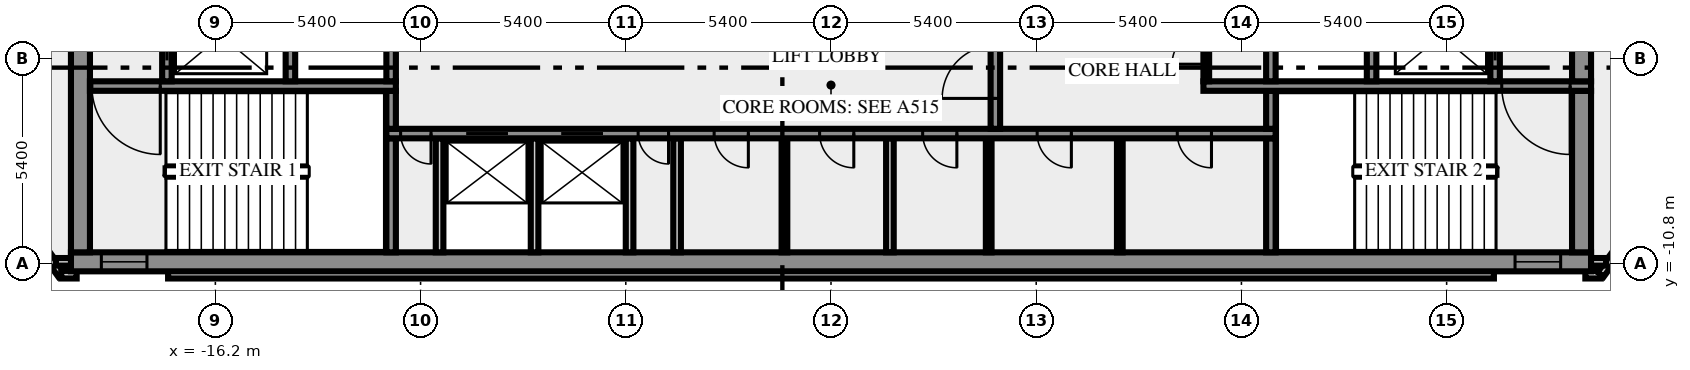
"""IFC4 building model, lengths in metres.
Left out: names, types, materials, properties, quantities, classifications, styles, units other than length and angle.
Written with IfcOpenShell. Run it as: python <this file> out.ifc"""

import sys

from ifc_helpers import new_model, si_unit, direction, frame, frame_2d, origin, place, context, subcontext, project, spatial, rectangle, extrude, element, fill, save


model = new_model("IFC4")
c1 = context("Model", 3, precision=1e-05, world=origin(), true_north=direction((0.0, 1.0)))
c2 = subcontext(c1, "Body", "Model", "MODEL_VIEW")
j1 = project(units=[si_unit("LENGTHUNIT", "METRE"), si_unit("PLANEANGLEUNIT", "RADIAN")], contexts=[c1])
p1 = place(None, origin())
s1 = spatial("IfcSite", under=j1, at=p1, CompositionType="ELEMENT")
p2 = place(p1, origin())
s2 = spatial("IfcBuilding", under=s1, at=p2, CompositionType="ELEMENT")
p3 = place(p2, frame((0.0, 0.0, 297.0)))
s3 = spatial("IfcBuildingStorey", under=s2, at=p3, CompositionType="ELEMENT", Elevation=297.0)
p4 = place(p3, frame((-21.833, -8.909, 0.0), z_axis=(0.0, 0.0, 1.0), x_axis=(0.587766567315, -0.809030569476, 0.0)))
e1 = element("IfcWall", 1, at=p4, inside=s3, PredefinedType="SOLIDWALL", context=c2, shape_type="SweptSolid", body=[
    extrude(rectangle(XDim=2.688, YDim=0.2, at=frame_2d((1.344, 0.0))), origin(), (0.0, 0.0, 1.0), 3.4),
])
p5 = place(p3, frame((-20.256, -11.088, 0.0), z_axis=(0.0, 0.0, 1.0), x_axis=(1.0, 0.0, 0.0)))
e2 = element("IfcWall", 2, at=p5, inside=s3, PredefinedType="SOLIDWALL", context=c2, shape_type="SweptSolid", body=[
    extrude(rectangle(XDim=0.406, YDim=0.2, at=frame_2d((0.203, 0.0))), origin(), (0.0, 0.0, 1.0), 3.4),
])
p6 = place(p3, frame((-17.444, -11.088, 0.0), z_axis=(0.0, 0.0, 1.0), x_axis=(1.0, 0.0, 0.0)))
e3 = element("IfcWall", 3, at=p6, inside=s3, PredefinedType="SOLIDWALL", context=c2, shape_type="SweptSolid", body=[
    extrude(rectangle(XDim=34.888, YDim=0.2, at=frame_2d((17.444, 0.0))), origin(), (0.0, 0.0, 1.0), 3.4),
])
p7 = place(p3, frame((19.85, -11.088, 0.0), z_axis=(0.0, 0.0, 1.0), x_axis=(1.0, 0.0, 0.0)))
e4 = element("IfcWall", 4, at=p7, inside=s3, PredefinedType="SOLIDWALL", context=c2, shape_type="SweptSolid", body=[
    extrude(rectangle(XDim=0.406, YDim=0.2, at=frame_2d((0.203, 0.0))), origin(), (0.0, 0.0, 1.0), 3.4),
])
p8 = place(p3, frame((20.253, -11.083, 0.0), z_axis=(0.0, 0.0, 1.0), x_axis=(0.587766567315, 0.809030569476, 0.0)))
e5 = element("IfcWall", 5, at=p8, inside=s3, PredefinedType="SOLIDWALL", context=c2, shape_type="SweptSolid", body=[
    extrude(rectangle(XDim=2.688, YDim=0.2, at=frame_2d((1.344, 0.0))), origin(), (0.0, 0.0, 1.0), 3.4),
])
for number, where, z_axis, x_axis in (
    (6, (-19.98, -10.75, 0.0), (0.0, 0.0, 1.0), (-1.0, 0.0, 0.0)),
    (7, (19.98, -10.75, 0.0), (0.0, 0.0, 1.0), (1.0, 0.0, 0.0)),
):
    element("IfcWall", number, at=place(p3, frame(where, z_axis=z_axis, x_axis=x_axis)), inside=s3, PredefinedType="SOLIDWALL", context=c2, shape_type="SweptSolid", body=[
        extrude(rectangle(XDim=0.417, YDim=0.2, at=frame_2d((0.208, 0.0))), origin(), (0.0, 0.0, 1.0), 3.4),
    ])
p9 = place(p3, frame((-20.0, -10.75, 0.0), z_axis=(0.0, 0.0, 1.0), x_axis=(1.0, 0.0, 0.0)))
e8 = element("IfcWall", 8, at=p9, inside=s3, PredefinedType="SHEAR", context=c2, shape_type="SweptSolid", body=[
    extrude(rectangle(XDim=40.0, YDim=0.5, at=frame_2d((20.0, 0.0))), origin(), (0.0, 0.0, 1.0), 3.4),
])
p10 = place(p9, frame((0.8, 0.0, 1.0)))
e9 = element("IfcOpeningElement", 9, at=p10, cuts=e8, PredefinedType="OPENING", context=c2, shape_type="SweptSolid", body=[
    extrude(rectangle(XDim=1.2, YDim=1.2, at=frame_2d((0.6, 0.6))), frame((0.0, 0.26, 0.0), z_axis=(0.0, -1.0, 0.0), x_axis=(1.0, 0.0, 0.0)), (0.0, 0.0, 1.0), 0.52),
])
p11 = place(p9, frame((38.0, 0.0, 1.0)))
e10 = element("IfcOpeningElement", 10, at=p11, cuts=e8, PredefinedType="OPENING", context=c2, shape_type="SweptSolid", body=[
    extrude(rectangle(XDim=1.2, YDim=1.2, at=frame_2d((0.6, 0.6))), frame((0.0, 0.26, 0.0), z_axis=(0.0, -1.0, 0.0), x_axis=(1.0, 0.0, 0.0)), (0.0, 0.0, 1.0), 0.52),
])
p12 = place(p3, frame((-19.75, -10.5, 0.0), z_axis=(0.0, 0.0, 1.0), x_axis=(0.0, 1.0, 0.0)))
e11 = element("IfcWall", 11, at=p12, inside=s3, PredefinedType="SHEAR", context=c2, shape_type="SweptSolid", body=[
    extrude(rectangle(XDim=8.8, YDim=0.5, at=frame_2d((4.4, 0.0))), origin(), (0.0, 0.0, 1.0), 3.4),
])
p13 = place(p3, frame((-11.575, -10.5, 0.0), z_axis=(0.0, 0.0, 1.0), x_axis=(0.0, 1.0, 0.0)))
e12 = element("IfcWall", 12, at=p13, inside=s3, PredefinedType="SHEAR", context=c2, shape_type="SweptSolid", body=[
    extrude(rectangle(XDim=3.0, YDim=0.25, at=frame_2d((1.5, 0.0))), origin(), (0.0, 0.0, 1.0), 3.4),
])
for number, where, z_axis, x_axis in (
    (13, (-10.3, -10.5, 0.0), (0.0, 0.0, 1.0), (0.0, 1.0, 0.0)),
    (14, (-7.8, -10.5, 0.0), (0.0, 0.0, 1.0), (0.0, 1.0, 0.0)),
    (15, (-5.3, -10.5, 0.0), (0.0, 0.0, 1.0), (0.0, 1.0, 0.0)),
    (16, (-4.05, -10.5, 0.0), (0.0, 0.0, 1.0), (0.0, 1.0, 0.0)),
):
    element("IfcWall", number, at=place(p3, frame(where, z_axis=z_axis, x_axis=x_axis)), inside=s3, PredefinedType="SOLIDWALL", context=c2, shape_type="SweptSolid", body=[
        extrude(rectangle(XDim=3.0, YDim=0.2, at=frame_2d((1.5, 0.0))), origin(), (0.0, 0.0, 1.0), 3.4),
    ])
p14 = place(p3, frame((-1.225, -10.5, 0.0), z_axis=(0.0, 0.0, 1.0), x_axis=(0.0, 1.0, 0.0)))
e17 = element("IfcWall", 17, at=p14, inside=s3, PredefinedType="PARTITIONING", context=c2, shape_type="SweptSolid", body=[
    extrude(rectangle(XDim=3.0, YDim=0.15, at=frame_2d((1.5, 0.0))), origin(), (0.0, 0.0, 1.0), 3.4),
])
p15 = place(p3, frame((1.55, -10.5, 0.0), z_axis=(0.0, 0.0, 1.0), x_axis=(0.0, 1.0, 0.0)))
e18 = element("IfcWall", 18, at=p15, inside=s3, PredefinedType="SOLIDWALL", context=c2, shape_type="SweptSolid", body=[
    extrude(rectangle(XDim=3.0, YDim=0.2, at=frame_2d((1.5, 0.0))), origin(), (0.0, 0.0, 1.0), 3.4),
])
for number, where, z_axis, x_axis in (
    (19, (4.15, -10.5, 0.0), (0.0, 0.0, 1.0), (0.0, 1.0, 0.0)),
    (20, (7.6, -10.5, 0.0), (0.0, 0.0, 1.0), (0.0, 1.0, 0.0)),
):
    element("IfcWall", number, at=place(p3, frame(where, z_axis=z_axis, x_axis=x_axis)), inside=s3, PredefinedType="PARTITIONING", context=c2, shape_type="SweptSolid", body=[
        extrude(rectangle(XDim=3.0, YDim=0.15, at=frame_2d((1.5, 0.0))), origin(), (0.0, 0.0, 1.0), 3.4),
    ])
p16 = place(p3, frame((11.575, -10.5, 0.0), z_axis=(0.0, 0.0, 1.0), x_axis=(0.0, 1.0, 0.0)))
e21 = element("IfcWall", 21, at=p16, inside=s3, PredefinedType="SHEAR", context=c2, shape_type="SweptSolid", body=[
    extrude(rectangle(XDim=3.0, YDim=0.25, at=frame_2d((1.5, 0.0))), origin(), (0.0, 0.0, 1.0), 3.4),
])
p17 = place(p3, frame((19.75, -10.5, 0.0), z_axis=(0.0, 0.0, 1.0), x_axis=(0.0, 1.0, 0.0)))
e22 = element("IfcWall", 22, at=p17, inside=s3, PredefinedType="SHEAR", context=c2, shape_type="SweptSolid", body=[
    extrude(rectangle(XDim=4.25, YDim=0.5, at=frame_2d((2.125, 0.0))), origin(), (0.0, 0.0, 1.0), 3.4),
])
p18 = place(p3, frame((11.7, -7.375, 0.0), z_axis=(0.0, 0.0, 1.0), x_axis=(-1.0, 0.0, 0.0)))
e23 = element("IfcWall", 23, at=p18, inside=s3, PredefinedType="SHEAR", context=c2, shape_type="SweptSolid", body=[
    extrude(rectangle(XDim=23.4, YDim=0.25, at=frame_2d((11.7, 0.0))), origin(), (0.0, 0.0, 1.0), 3.4),
])
p19 = place(p18, frame((22.225, 0.0, 0.0)))
e24 = element("IfcOpeningElement", 24, at=p19, cuts=e23, PredefinedType="OPENING", context=c2, shape_type="SweptSolid", body=[
    extrude(rectangle(XDim=0.8, YDim=2.1, at=frame_2d((0.4, 1.05))), frame((0.0, 0.135, 0.0), z_axis=(0.0, -1.0, 0.0), x_axis=(1.0, 0.0, 0.0)), (0.0, 0.0, 1.0), 0.27),
])
p20 = place(p18, frame((20.2, 0.0, 0.0)))
e25 = element("IfcOpeningElement", 25, at=p20, cuts=e23, PredefinedType="OPENING", context=c2, shape_type="SweptSolid", body=[
    extrude(rectangle(XDim=1.1, YDim=2.1, at=frame_2d((0.55, 1.05))), frame((0.0, 0.135, 0.0), z_axis=(0.0, -1.0, 0.0), x_axis=(1.0, 0.0, 0.0)), (0.0, 0.0, 1.0), 0.27),
])
p21 = place(p18, frame((17.7, 0.0, 0.0)))
e26 = element("IfcOpeningElement", 26, at=p21, cuts=e23, PredefinedType="OPENING", context=c2, shape_type="SweptSolid", body=[
    extrude(rectangle(XDim=1.1, YDim=2.1, at=frame_2d((0.55, 1.05))), frame((0.0, 0.135, 0.0), z_axis=(0.0, -1.0, 0.0), x_axis=(1.0, 0.0, 0.0)), (0.0, 0.0, 1.0), 0.27),
])
p22 = place(p18, frame((15.975, 0.0, 0.0)))
e27 = element("IfcOpeningElement", 27, at=p22, cuts=e23, PredefinedType="OPENING", context=c2, shape_type="SweptSolid", body=[
    extrude(rectangle(XDim=0.8, YDim=2.1, at=frame_2d((0.4, 1.05))), frame((0.0, 0.135, 0.0), z_axis=(0.0, -1.0, 0.0), x_axis=(1.0, 0.0, 0.0)), (0.0, 0.0, 1.0), 0.27),
])
p23 = place(p18, frame((13.875, 0.0, 0.0)))
e28 = element("IfcOpeningElement", 28, at=p23, cuts=e23, PredefinedType="OPENING", context=c2, shape_type="SweptSolid", body=[
    extrude(rectangle(XDim=0.9, YDim=2.1, at=frame_2d((0.45, 1.05))), frame((0.0, 0.135, 0.0), z_axis=(0.0, -1.0, 0.0), x_axis=(1.0, 0.0, 0.0)), (0.0, 0.0, 1.0), 0.27),
])
p24 = place(p18, frame((11.1, 0.0, 0.0)))
e29 = element("IfcOpeningElement", 29, at=p24, cuts=e23, PredefinedType="OPENING", context=c2, shape_type="SweptSolid", body=[
    extrude(rectangle(XDim=0.9, YDim=2.1, at=frame_2d((0.45, 1.05))), frame((0.0, 0.135, 0.0), z_axis=(0.0, -1.0, 0.0), x_axis=(1.0, 0.0, 0.0)), (0.0, 0.0, 1.0), 0.27),
])
p25 = place(p18, frame((8.388, 0.0, 0.0)))
e30 = element("IfcOpeningElement", 30, at=p25, cuts=e23, PredefinedType="OPENING", context=c2, shape_type="SweptSolid", body=[
    extrude(rectangle(XDim=0.9, YDim=2.1, at=frame_2d((0.45, 1.05))), frame((0.0, 0.135, 0.0), z_axis=(0.0, -1.0, 0.0), x_axis=(1.0, 0.0, 0.0)), (0.0, 0.0, 1.0), 0.27),
])
p26 = place(p18, frame((5.375, 0.0, 0.0)))
e31 = element("IfcOpeningElement", 31, at=p26, cuts=e23, PredefinedType="OPENING", context=c2, shape_type="SweptSolid", body=[
    extrude(rectangle(XDim=0.9, YDim=2.1, at=frame_2d((0.45, 1.05))), frame((0.0, 0.135, 0.0), z_axis=(0.0, -1.0, 0.0), x_axis=(1.0, 0.0, 0.0)), (0.0, 0.0, 1.0), 0.27),
])
p27 = place(p18, frame((1.688, 0.0, 0.0)))
e32 = element("IfcOpeningElement", 32, at=p27, cuts=e23, PredefinedType="OPENING", context=c2, shape_type="SweptSolid", body=[
    extrude(rectangle(XDim=0.9, YDim=2.1, at=frame_2d((0.45, 1.05))), frame((0.0, 0.135, 0.0), z_axis=(0.0, -1.0, 0.0), x_axis=(1.0, 0.0, 0.0)), (0.0, 0.0, 1.0), 0.27),
])
p28 = place(p3, frame((-11.575, -7.25, 0.0), z_axis=(0.0, 0.0, 1.0), x_axis=(0.0, 1.0, 0.0)))
e33 = element("IfcWall", 33, at=p28, inside=s3, PredefinedType="SHEAR", context=c2, shape_type="SweptSolid", body=[
    extrude(rectangle(XDim=1.0, YDim=0.25, at=frame_2d((0.5, 0.0))), origin(), (0.0, 0.0, 1.0), 3.4),
])
p29 = place(p3, frame((4.325, -7.25, 0.0), z_axis=(0.0, 0.0, 1.0), x_axis=(0.0, 1.0, 0.0)))
e34 = element("IfcWall", 34, at=p29, inside=s3, PredefinedType="SHEAR", context=c2, shape_type="SweptSolid", body=[
    extrude(rectangle(XDim=3.0, YDim=0.25, at=frame_2d((1.5, 0.0))), origin(), (0.0, 0.0, 1.0), 3.4),
])
p30 = place(p29, frame((0.8, 0.0, 0.0)))
e35 = element("IfcOpeningElement", 35, at=p30, cuts=e34, PredefinedType="OPENING", context=c2, shape_type="SweptSolid", body=[
    extrude(rectangle(XDim=1.4, YDim=2.1, at=frame_2d((0.7, 1.05))), frame((0.0, 0.135, 0.0), z_axis=(0.0, -1.0, 0.0), x_axis=(1.0, 0.0, 0.0)), (0.0, 0.0, 1.0), 0.27),
])
p31 = place(p3, frame((11.575, -7.25, 0.0), z_axis=(0.0, 0.0, 1.0), x_axis=(0.0, 1.0, 0.0)))
e36 = element("IfcWall", 36, at=p31, inside=s3, PredefinedType="SHEAR", context=c2, shape_type="SweptSolid", body=[
    extrude(rectangle(XDim=1.0, YDim=0.25, at=frame_2d((0.5, 0.0))), origin(), (0.0, 0.0, 1.0), 3.4),
])
p32 = place(p3, frame((-11.45, -6.125, 0.0), z_axis=(0.0, 0.0, 1.0), x_axis=(-1.0, 0.0, 0.0)))
e37 = element("IfcWall", 37, at=p32, inside=s3, PredefinedType="SHEAR", context=c2, shape_type="SweptSolid", body=[
    extrude(rectangle(XDim=8.05, YDim=0.25, at=frame_2d((4.025, 0.0))), origin(), (0.0, 0.0, 1.0), 3.4),
])
p33 = place(p32, frame((6.2, 0.0, 0.0)))
e38 = element("IfcOpeningElement", 38, at=p33, cuts=e37, PredefinedType="OPENING", context=c2, shape_type="SweptSolid", body=[
    extrude(rectangle(XDim=1.8, YDim=2.1, at=frame_2d((0.9, 1.05))), frame((0.0, 0.135, 0.0), z_axis=(0.0, -1.0, 0.0), x_axis=(1.0, 0.0, 0.0)), (0.0, 0.0, 1.0), 0.27),
])
p34 = place(p3, frame((20.0, -6.125, 0.0), z_axis=(0.0, 0.0, 1.0), x_axis=(-1.0, 0.0, 0.0)))
e39 = element("IfcWall", 39, at=p34, inside=s3, PredefinedType="SHEAR", context=c2, shape_type="SweptSolid", body=[
    extrude(rectangle(XDim=10.2, YDim=0.25, at=frame_2d((5.1, 0.0))), origin(), (0.0, 0.0, 1.0), 3.4),
])
p35 = place(p34, frame((0.55, 0.0, 0.0)))
e40 = element("IfcOpeningElement", 40, at=p35, cuts=e39, PredefinedType="OPENING", context=c2, shape_type="SweptSolid", body=[
    extrude(rectangle(XDim=1.8, YDim=2.1, at=frame_2d((0.9, 1.05))), frame((0.0, 0.135, 0.0), z_axis=(0.0, -1.0, 0.0), x_axis=(1.0, 0.0, 0.0)), (0.0, 0.0, 1.0), 0.27),
])
p36 = place(p3, frame((-17.475, -6.0, 0.0), z_axis=(0.0, 0.0, 1.0), x_axis=(0.0, 1.0, 0.0)))
e41 = element("IfcWall", 41, at=p36, inside=s3, PredefinedType="SHEAR", context=c2, shape_type="SweptSolid", body=[
    extrude(rectangle(XDim=4.3, YDim=0.25, at=frame_2d((2.15, 0.0))), origin(), (0.0, 0.0, 1.0), 3.4),
])
p37 = place(p36, frame((0.55, 0.0, 0.0)))
e42 = element("IfcOpeningElement", 42, at=p37, cuts=e41, PredefinedType="OPENING", context=c2, shape_type="SweptSolid", body=[
    extrude(rectangle(XDim=1.3, YDim=2.1, at=frame_2d((0.65, 1.05))), frame((0.0, 0.135, 0.0), z_axis=(0.0, -1.0, 0.0), x_axis=(1.0, 0.0, 0.0)), (0.0, 0.0, 1.0), 0.27),
])
for number, where, z_axis, x_axis in (
    (43, (-14.225, -6.0, 0.0), (0.0, 0.0, 1.0), (0.0, 1.0, 0.0)),
    (44, (-11.575, -6.0, 0.0), (0.0, 0.0, 1.0), (0.0, 1.0, 0.0)),
):
    element("IfcWall", number, at=place(p3, frame(where, z_axis=z_axis, x_axis=x_axis)), inside=s3, PredefinedType="SHEAR", context=c2, shape_type="SweptSolid", body=[
        extrude(rectangle(XDim=1.75, YDim=0.25, at=frame_2d((0.875, 0.0))), origin(), (0.0, 0.0, 1.0), 3.4),
    ])
p38 = place(p3, frame((9.875, -6.0, 0.0), z_axis=(0.0, 0.0, 1.0), x_axis=(0.0, 1.0, 0.0)))
e45 = element("IfcWall", 45, at=p38, inside=s3, PredefinedType="PARTITIONING", context=c2, shape_type="SweptSolid", body=[
    extrude(rectangle(XDim=1.75, YDim=0.15, at=frame_2d((0.875, 0.0))), origin(), (0.0, 0.0, 1.0), 3.4),
])
p39 = place(p38, frame((0.45, 0.0, 0.0)))
e46 = element("IfcOpeningElement", 46, at=p39, cuts=e45, PredefinedType="OPENING", context=c2, shape_type="SweptSolid", body=[
    extrude(rectangle(XDim=0.9, YDim=2.1, at=frame_2d((0.45, 1.05))), frame((0.0, 0.085, 0.0), z_axis=(0.0, -1.0, 0.0), x_axis=(1.0, 0.0, 0.0)), (0.0, 0.0, 1.0), 0.17),
])
for number, where, z_axis, x_axis in (
    (47, (11.575, -6.0, 0.0), (0.0, 0.0, 1.0), (0.0, 1.0, 0.0)),
    (48, (14.225, -6.0, 0.0), (0.0, 0.0, 1.0), (0.0, 1.0, 0.0)),
):
    element("IfcWall", number, at=place(p3, frame(where, z_axis=z_axis, x_axis=x_axis)), inside=s3, PredefinedType="SHEAR", context=c2, shape_type="SweptSolid", body=[
        extrude(rectangle(XDim=1.75, YDim=0.25, at=frame_2d((0.875, 0.0))), origin(), (0.0, 0.0, 1.0), 3.4),
    ])
p40 = place(p3, frame((17.475, -6.0, 0.0), z_axis=(0.0, 0.0, 1.0), x_axis=(0.0, 1.0, 0.0)))
e49 = element("IfcWall", 49, at=p40, inside=s3, PredefinedType="SHEAR", context=c2, shape_type="SweptSolid", body=[
    extrude(rectangle(XDim=4.3, YDim=0.25, at=frame_2d((2.15, 0.0))), origin(), (0.0, 0.0, 1.0), 3.4),
])
p41 = place(p40, frame((0.55, 0.0, 0.0)))
e50 = element("IfcOpeningElement", 50, at=p41, cuts=e49, PredefinedType="OPENING", context=c2, shape_type="SweptSolid", body=[
    extrude(rectangle(XDim=1.3, YDim=2.1, at=frame_2d((0.65, 1.05))), frame((0.0, 0.135, 0.0), z_axis=(0.0, -1.0, 0.0), x_axis=(1.0, 0.0, 0.0)), (0.0, 0.0, 1.0), 0.27),
])
p42 = place(p3, frame((19.75, -6.0, 0.0), z_axis=(0.0, 0.0, 1.0), x_axis=(0.0, 1.0, 0.0)))
e51 = element("IfcWall", 51, at=p42, inside=s3, PredefinedType="SHEAR", context=c2, shape_type="SweptSolid", body=[
    extrude(rectangle(XDim=4.3, YDim=0.5, at=frame_2d((2.15, 0.0))), origin(), (0.0, 0.0, 1.0), 3.4),
])
p43 = place(p10, origin())
e52 = element("IfcWindow", 52, at=p43, inside=s3, PartitioningType="SINGLE_PANEL", PredefinedType="WINDOW", context=c2, shape_type="SweptSolid", body=[
    extrude(rectangle(XDim=1.2, YDim=1.2, at=frame_2d((0.6, 0.6))), frame((0.0, 0.03, 0.0), z_axis=(0.0, -1.0, 0.0), x_axis=(1.0, 0.0, 0.0)), (0.0, 0.0, 1.0), 0.06),
])
fill(e9, e52)
p44 = place(p11, origin())
e53 = element("IfcWindow", 53, at=p44, inside=s3, PartitioningType="SINGLE_PANEL", PredefinedType="WINDOW", context=c2, shape_type="SweptSolid", body=[
    extrude(rectangle(XDim=1.2, YDim=1.2, at=frame_2d((0.6, 0.6))), frame((0.0, 0.03, 0.0), z_axis=(0.0, -1.0, 0.0), x_axis=(1.0, 0.0, 0.0)), (0.0, 0.0, 1.0), 0.06),
])
fill(e10, e53)
p45 = place(p19, origin())
e54 = element("IfcDoor", 54, at=p45, inside=s3, OperationType="SINGLE_SWING_RIGHT", PredefinedType="DOOR", context=c2, shape_type="SweptSolid", body=[
    extrude(rectangle(XDim=0.8, YDim=2.1, at=frame_2d((0.4, 1.05))), frame((0.0, 0.025, 0.0), z_axis=(0.0, -1.0, 0.0), x_axis=(1.0, 0.0, 0.0)), (0.0, 0.0, 1.0), 0.05),
])
fill(e24, e54)
p46 = place(p20, origin())
e55 = element("IfcDoor", 55, at=p46, inside=s3, OperationType="DOUBLE_DOOR_SLIDING", PredefinedType="DOOR", context=c2, shape_type="SweptSolid", body=[
    extrude(rectangle(XDim=1.1, YDim=2.1, at=frame_2d((0.55, 1.05))), frame((0.0, 0.025, 0.0), z_axis=(0.0, -1.0, 0.0), x_axis=(1.0, 0.0, 0.0)), (0.0, 0.0, 1.0), 0.05),
])
fill(e25, e55)
p47 = place(p21, origin())
e56 = element("IfcDoor", 56, at=p47, inside=s3, OperationType="DOUBLE_DOOR_SLIDING", PredefinedType="DOOR", context=c2, shape_type="SweptSolid", body=[
    extrude(rectangle(XDim=1.1, YDim=2.1, at=frame_2d((0.55, 1.05))), frame((0.0, 0.025, 0.0), z_axis=(0.0, -1.0, 0.0), x_axis=(1.0, 0.0, 0.0)), (0.0, 0.0, 1.0), 0.05),
])
fill(e26, e56)
p48 = place(p22, origin())
e57 = element("IfcDoor", 57, at=p48, inside=s3, OperationType="SINGLE_SWING_RIGHT", PredefinedType="DOOR", context=c2, shape_type="SweptSolid", body=[
    extrude(rectangle(XDim=0.8, YDim=2.1, at=frame_2d((0.4, 1.05))), frame((0.0, 0.025, 0.0), z_axis=(0.0, -1.0, 0.0), x_axis=(1.0, 0.0, 0.0)), (0.0, 0.0, 1.0), 0.05),
])
fill(e27, e57)
p49 = place(p23, origin())
e58 = element("IfcDoor", 58, at=p49, inside=s3, OperationType="SINGLE_SWING_RIGHT", PredefinedType="DOOR", context=c2, shape_type="SweptSolid", body=[
    extrude(rectangle(XDim=0.9, YDim=2.1, at=frame_2d((0.45, 1.05))), frame((0.0, 0.025, 0.0), z_axis=(0.0, -1.0, 0.0), x_axis=(1.0, 0.0, 0.0)), (0.0, 0.0, 1.0), 0.05),
])
fill(e28, e58)
p50 = place(p24, origin())
e59 = element("IfcDoor", 59, at=p50, inside=s3, OperationType="SINGLE_SWING_LEFT", PredefinedType="DOOR", context=c2, shape_type="SweptSolid", body=[
    extrude(rectangle(XDim=0.9, YDim=2.1, at=frame_2d((0.45, 1.05))), frame((0.0, 0.025, 0.0), z_axis=(0.0, -1.0, 0.0), x_axis=(1.0, 0.0, 0.0)), (0.0, 0.0, 1.0), 0.05),
])
fill(e29, e59)
p51 = place(p25, origin())
e60 = element("IfcDoor", 60, at=p51, inside=s3, OperationType="SINGLE_SWING_LEFT", PredefinedType="DOOR", context=c2, shape_type="SweptSolid", body=[
    extrude(rectangle(XDim=0.9, YDim=2.1, at=frame_2d((0.45, 1.05))), frame((0.0, 0.025, 0.0), z_axis=(0.0, -1.0, 0.0), x_axis=(1.0, 0.0, 0.0)), (0.0, 0.0, 1.0), 0.05),
])
fill(e30, e60)
p52 = place(p26, origin())
e61 = element("IfcDoor", 61, at=p52, inside=s3, OperationType="SINGLE_SWING_LEFT", PredefinedType="DOOR", context=c2, shape_type="SweptSolid", body=[
    extrude(rectangle(XDim=0.9, YDim=2.1, at=frame_2d((0.45, 1.05))), frame((0.0, 0.025, 0.0), z_axis=(0.0, -1.0, 0.0), x_axis=(1.0, 0.0, 0.0)), (0.0, 0.0, 1.0), 0.05),
])
fill(e31, e61)
p53 = place(p27, origin())
e62 = element("IfcDoor", 62, at=p53, inside=s3, OperationType="SINGLE_SWING_LEFT", PredefinedType="DOOR", context=c2, shape_type="SweptSolid", body=[
    extrude(rectangle(XDim=0.9, YDim=2.1, at=frame_2d((0.45, 1.05))), frame((0.0, 0.025, 0.0), z_axis=(0.0, -1.0, 0.0), x_axis=(1.0, 0.0, 0.0)), (0.0, 0.0, 1.0), 0.05),
])
fill(e32, e62)
p54 = place(p30, origin())
e63 = element("IfcDoor", 63, at=p54, inside=s3, OperationType="DOUBLE_DOOR_SINGLE_SWING", PredefinedType="DOOR", context=c2, shape_type="SweptSolid", body=[
    extrude(rectangle(XDim=1.4, YDim=2.1, at=frame_2d((0.7, 1.05))), frame((0.0, 0.025, 0.0), z_axis=(0.0, -1.0, 0.0), x_axis=(1.0, 0.0, 0.0)), (0.0, 0.0, 1.0), 0.05),
])
fill(e35, e63)
p55 = place(p33, origin())
e64 = element("IfcDoor", 64, at=p55, inside=s3, OperationType="DOUBLE_DOOR_SINGLE_SWING", PredefinedType="DOOR", context=c2, shape_type="SweptSolid", body=[
    extrude(rectangle(XDim=1.8, YDim=2.1, at=frame_2d((0.9, 1.05))), frame((0.0, 0.025, 0.0), z_axis=(0.0, -1.0, 0.0), x_axis=(1.0, 0.0, 0.0)), (0.0, 0.0, 1.0), 0.05),
])
fill(e38, e64)
p56 = place(p35, origin())
e65 = element("IfcDoor", 65, at=p56, inside=s3, OperationType="DOUBLE_DOOR_SINGLE_SWING", PredefinedType="DOOR", context=c2, shape_type="SweptSolid", body=[
    extrude(rectangle(XDim=1.8, YDim=2.1, at=frame_2d((0.9, 1.05))), frame((0.0, 0.025, 0.0), z_axis=(0.0, -1.0, 0.0), x_axis=(1.0, 0.0, 0.0)), (0.0, 0.0, 1.0), 0.05),
])
fill(e40, e65)
p57 = place(p37, origin())
e66 = element("IfcDoor", 66, at=p57, inside=s3, OperationType="DOUBLE_DOOR_SLIDING", PredefinedType="DOOR", context=c2, shape_type="SweptSolid", body=[
    extrude(rectangle(XDim=1.3, YDim=2.1, at=frame_2d((0.65, 1.05))), frame((0.0, 0.025, 0.0), z_axis=(0.0, -1.0, 0.0), x_axis=(1.0, 0.0, 0.0)), (0.0, 0.0, 1.0), 0.05),
])
fill(e42, e66)
p58 = place(p39, origin())
e67 = element("IfcDoor", 67, at=p58, inside=s3, OperationType="SINGLE_SWING_RIGHT", PredefinedType="DOOR", context=c2, shape_type="SweptSolid", body=[
    extrude(rectangle(XDim=0.9, YDim=2.1, at=frame_2d((0.45, 1.05))), frame((0.0, 0.025, 0.0), z_axis=(0.0, -1.0, 0.0), x_axis=(1.0, 0.0, 0.0)), (0.0, 0.0, 1.0), 0.05),
])
fill(e46, e67)
p59 = place(p41, origin())
e68 = element("IfcDoor", 68, at=p59, inside=s3, OperationType="DOUBLE_DOOR_SLIDING", PredefinedType="DOOR", context=c2, shape_type="SweptSolid", body=[
    extrude(rectangle(XDim=1.3, YDim=2.1, at=frame_2d((0.65, 1.05))), frame((0.0, 0.025, 0.0), z_axis=(0.0, -1.0, 0.0), x_axis=(1.0, 0.0, 0.0)), (0.0, 0.0, 1.0), 0.05),
])
fill(e50, e68)
save(model, sys.argv[1])
